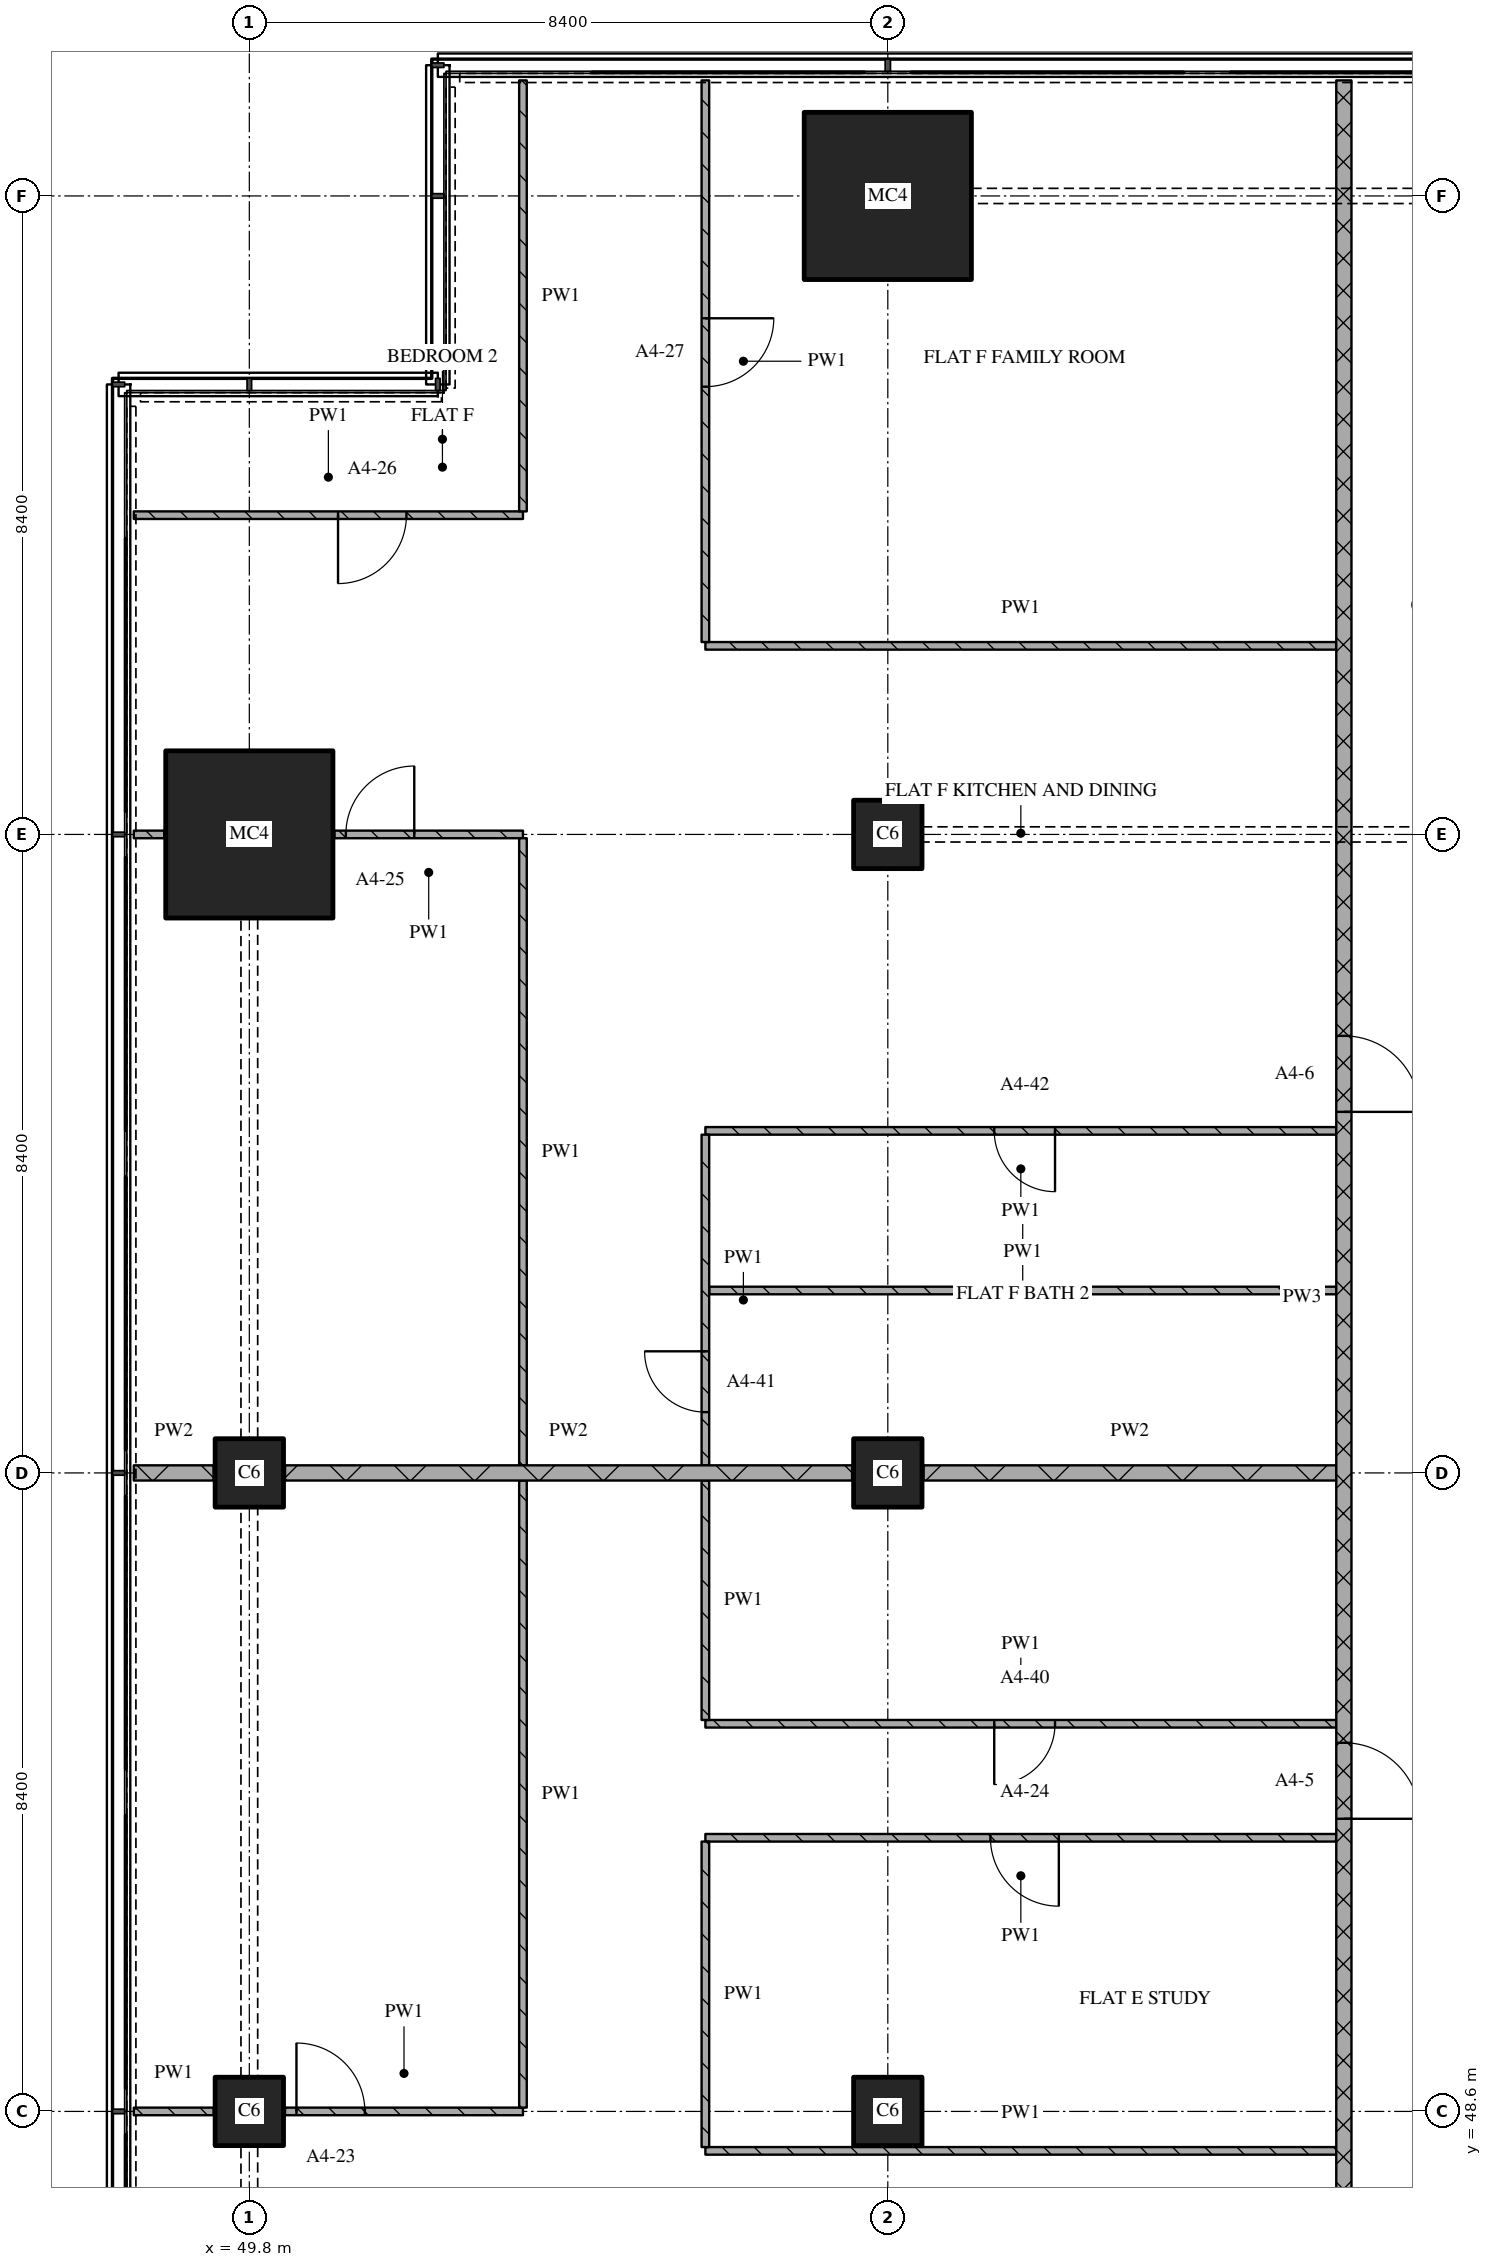
"""IFC4 building model, lengths in metres.
Left out: names, types, materials, properties, quantities, classifications, styles, units other than length and angle.
Written with IfcOpenShell. Run it as: python <this file> out.ifc"""

import sys

from ifc_helpers import new_model, si_unit, direction, frame, frame_2d, origin, origin_2d, place, context, subcontext, project, spatial, rectangle, extrude, element, fill, save


model = new_model("IFC4")
c1 = context("Model", 3, precision=1e-05, world=origin(), true_north=direction((0.0, 1.0)))
c2 = subcontext(c1, "Body", "Model", "MODEL_VIEW")
j1 = project(units=[si_unit("LENGTHUNIT", "METRE"), si_unit("PLANEANGLEUNIT", "RADIAN")], contexts=[c1])
p1 = place(None, origin())
s1 = spatial("IfcSite", under=j1, at=p1, CompositionType="ELEMENT")
p2 = place(p1, origin())
s2 = spatial("IfcBuilding", under=s1, at=p2, CompositionType="ELEMENT")
p3 = place(p2, frame((0.0, 0.0, 76.8)))
s3 = spatial("IfcBuildingStorey", under=s2, at=p3, CompositionType="ELEMENT", Elevation=76.8)
for number, where, z_axis, x_axis in (
    (1, (49.8, 48.6, 0.0), (0.0, 0.0, 1.0), (1.0, 0.0, 0.0)),
    (2, (49.8, 57.0, 0.0), (0.0, 0.0, 1.0), (1.0, 0.0, 0.0)),
):
    element("IfcColumn", number, at=place(p3, frame(where, z_axis=z_axis, x_axis=x_axis)), inside=s3, PredefinedType="COLUMN", context=c2, shape_type="SweptSolid", body=[
        extrude(rectangle(XDim=0.9, YDim=0.9, at=origin_2d()), origin(), (0.0, 0.0, 1.0), 3.6),
    ])
p4 = place(p3, frame((49.8, 65.4, 0.0), z_axis=(0.0, 0.0, 1.0), x_axis=(1.0, 0.0, 0.0)))
e3 = element("IfcColumn", 3, at=p4, inside=s3, PredefinedType="COLUMN", context=c2, shape_type="SweptSolid", body=[
    extrude(rectangle(XDim=2.2, YDim=2.2, at=origin_2d()), origin(), (0.0, 0.0, 1.0), 3.6),
])
for number, where, z_axis, x_axis in (
    (4, (58.2, 48.6, 0.0), (0.0, 0.0, 1.0), (1.0, 0.0, 0.0)),
    (5, (58.2, 57.0, 0.0), (0.0, 0.0, 1.0), (1.0, 0.0, 0.0)),
    (6, (58.2, 65.4, 0.0), (0.0, 0.0, 1.0), (1.0, 0.0, 0.0)),
):
    element("IfcColumn", number, at=place(p3, frame(where, z_axis=z_axis, x_axis=x_axis)), inside=s3, PredefinedType="COLUMN", context=c2, shape_type="SweptSolid", body=[
        extrude(rectangle(XDim=0.9, YDim=0.9, at=origin_2d()), origin(), (0.0, 0.0, 1.0), 3.6),
    ])
p5 = place(p3, frame((58.2, 73.8, 0.0), z_axis=(0.0, 0.0, 1.0), x_axis=(1.0, 0.0, 0.0)))
e7 = element("IfcColumn", 7, at=p5, inside=s3, PredefinedType="COLUMN", context=c2, shape_type="SweptSolid", body=[
    extrude(rectangle(XDim=2.2, YDim=2.2, at=origin_2d()), origin(), (0.0, 0.0, 1.0), 3.6),
])
p6 = place(p3, frame((55.8, 48.081, 0.0), z_axis=(0.0, 0.0, 1.0), x_axis=(1.0, 0.0, 0.0)))
e8 = element("IfcWall", 8, at=p6, inside=s3, PredefinedType="PARTITIONING", context=c2, shape_type="SweptSolid", body=[
    extrude(rectangle(XDim=8.3, YDim=0.1, at=frame_2d((4.15, 0.0))), origin(), (0.0, 0.0, 1.0), 3.32),
])
p7 = place(p3, frame((48.28, 48.6, 0.0), z_axis=(0.0, 0.0, 1.0), x_axis=(1.0, 0.0, 0.0)))
e9 = element("IfcWall", 9, at=p7, inside=s3, PredefinedType="PARTITIONING", context=c2, shape_type="SweptSolid", body=[
    extrude(rectangle(XDim=1.05, YDim=0.1, at=frame_2d((0.525, 0.0))), origin(), (0.0, 0.0, 1.0), 3.32),
])
p8 = place(p3, frame((50.27, 48.6, 0.0), z_axis=(0.0, 0.0, 1.0), x_axis=(1.0, 0.0, 0.0)))
e10 = element("IfcWall", 10, at=p8, inside=s3, PredefinedType="PARTITIONING", context=c2, shape_type="SweptSolid", body=[
    extrude(rectangle(XDim=3.13, YDim=0.1, at=frame_2d((1.565, 0.0))), origin(), (0.0, 0.0, 1.0), 3.32),
])
p9 = place(p8, frame((0.15, 0.0, 0.0)))
e11 = element("IfcOpeningElement", 11, at=p9, cuts=e10, PredefinedType="OPENING", context=c2, shape_type="SweptSolid", body=[
    extrude(rectangle(XDim=0.9, YDim=2.1, at=frame_2d((0.45, 1.05))), frame((0.0, 0.06, 0.0), z_axis=(0.0, -1.0, 0.0), x_axis=(1.0, 0.0, 0.0)), (0.0, 0.0, 1.0), 0.12),
])
p10 = place(p3, frame((64.1, 52.2, 0.0), z_axis=(0.0, 0.0, 1.0), x_axis=(-1.0, 0.0, 0.0)))
e12 = element("IfcWall", 12, at=p10, inside=s3, PredefinedType="PARTITIONING", context=c2, shape_type="SweptSolid", body=[
    extrude(rectangle(XDim=8.3, YDim=0.1, at=frame_2d((4.15, 0.0))), origin(), (0.0, 0.0, 1.0), 3.32),
])
p11 = place(p10, frame((3.65, 0.0, 0.0)))
e13 = element("IfcOpeningElement", 13, at=p11, cuts=e12, PredefinedType="OPENING", context=c2, shape_type="SweptSolid", body=[
    extrude(rectangle(XDim=0.9, YDim=2.1, at=frame_2d((0.45, 1.05))), frame((0.0, 0.06, 0.0), z_axis=(0.0, -1.0, 0.0), x_axis=(1.0, 0.0, 0.0)), (0.0, 0.0, 1.0), 0.12),
])
p12 = place(p3, frame((55.8, 53.7, 0.0), z_axis=(0.0, 0.0, 1.0), x_axis=(1.0, 0.0, 0.0)))
e14 = element("IfcWall", 14, at=p12, inside=s3, PredefinedType="PARTITIONING", context=c2, shape_type="SweptSolid", body=[
    extrude(rectangle(XDim=8.3, YDim=0.1, at=frame_2d((4.15, 0.0))), origin(), (0.0, 0.0, 1.0), 3.32),
])
p13 = place(p12, frame((3.8, 0.0, 0.0)))
e15 = element("IfcOpeningElement", 15, at=p13, cuts=e14, PredefinedType="OPENING", context=c2, shape_type="SweptSolid", body=[
    extrude(rectangle(XDim=0.8, YDim=2.1, at=frame_2d((0.4, 1.05))), frame((0.0, 0.06, 0.0), z_axis=(0.0, -1.0, 0.0), x_axis=(1.0, 0.0, 0.0)), (0.0, 0.0, 1.0), 0.12),
])
p14 = place(p3, frame((48.28, 57.0, 0.0), z_axis=(0.0, 0.0, 1.0), x_axis=(1.0, 0.0, 0.0)))
e16 = element("IfcWall", 16, at=p14, inside=s3, PredefinedType="PARTITIONING", context=c2, shape_type="SweptSolid", body=[
    extrude(rectangle(XDim=1.05, YDim=0.2, at=frame_2d((0.525, 0.0))), origin(), (0.0, 0.0, 1.0), 3.32),
])
p15 = place(p3, frame((50.27, 57.0, 0.0), z_axis=(0.0, 0.0, 1.0), x_axis=(1.0, 0.0, 0.0)))
e17 = element("IfcWall", 17, at=p15, inside=s3, PredefinedType="PARTITIONING", context=c2, shape_type="SweptSolid", body=[
    extrude(rectangle(XDim=7.46, YDim=0.2, at=frame_2d((3.73, 0.0))), origin(), (0.0, 0.0, 1.0), 3.32),
])
p16 = place(p3, frame((58.67, 57.0, 0.0), z_axis=(0.0, 0.0, 1.0), x_axis=(1.0, 0.0, 0.0)))
e18 = element("IfcWall", 18, at=p16, inside=s3, PredefinedType="PARTITIONING", context=c2, shape_type="SweptSolid", body=[
    extrude(rectangle(XDim=5.43, YDim=0.2, at=frame_2d((2.715, 0.0))), origin(), (0.0, 0.0, 1.0), 3.32),
])
p17 = place(p3, frame((55.85, 59.4, 0.0), z_axis=(0.0, 0.0, 1.0), x_axis=(1.0, 0.0, 0.0)))
e19 = element("IfcWall", 19, at=p17, inside=s3, PredefinedType="PARTITIONING", context=c2, shape_type="SweptSolid", body=[
    extrude(rectangle(XDim=8.25, YDim=0.1, at=frame_2d((4.125, 0.0))), origin(), (0.0, 0.0, 1.0), 3.32),
])
p18 = place(p3, frame((64.1, 61.5, 0.0), z_axis=(0.0, 0.0, 1.0), x_axis=(-1.0, 0.0, 0.0)))
e20 = element("IfcWall", 20, at=p18, inside=s3, PredefinedType="PARTITIONING", context=c2, shape_type="SweptSolid", body=[
    extrude(rectangle(XDim=8.3, YDim=0.1, at=frame_2d((4.15, 0.0))), origin(), (0.0, 0.0, 1.0), 3.32),
])
p19 = place(p18, frame((3.7, 0.0, 0.0)))
e21 = element("IfcOpeningElement", 21, at=p19, cuts=e20, PredefinedType="OPENING", context=c2, shape_type="SweptSolid", body=[
    extrude(rectangle(XDim=0.8, YDim=2.1, at=frame_2d((0.4, 1.05))), frame((0.0, 0.06, 0.0), z_axis=(0.0, -1.0, 0.0), x_axis=(1.0, 0.0, 0.0)), (0.0, 0.0, 1.0), 0.12),
])
p20 = place(p3, frame((48.28, 65.4, 0.0), z_axis=(0.0, 0.0, 1.0), x_axis=(1.0, 0.0, 0.0)))
e22 = element("IfcWall", 22, at=p20, inside=s3, PredefinedType="PARTITIONING", context=c2, shape_type="SweptSolid", body=[
    extrude(rectangle(XDim=0.4, YDim=0.1, at=frame_2d((0.2, 0.0))), origin(), (0.0, 0.0, 1.0), 3.32),
])
p21 = place(p3, frame((53.4, 65.4, 0.0), z_axis=(0.0, 0.0, 1.0), x_axis=(-1.0, 0.0, 0.0)))
e23 = element("IfcWall", 23, at=p21, inside=s3, PredefinedType="PARTITIONING", context=c2, shape_type="SweptSolid", body=[
    extrude(rectangle(XDim=2.48, YDim=0.1, at=frame_2d((1.24, 0.0))), origin(), (0.0, 0.0, 1.0), 3.32),
])
p22 = place(p21, frame((1.43, 0.0, 0.0)))
e24 = element("IfcOpeningElement", 24, at=p22, cuts=e23, PredefinedType="OPENING", context=c2, shape_type="SweptSolid", body=[
    extrude(rectangle(XDim=0.9, YDim=2.1, at=frame_2d((0.45, 1.05))), frame((0.0, 0.06, 0.0), z_axis=(0.0, -1.0, 0.0), x_axis=(1.0, 0.0, 0.0)), (0.0, 0.0, 1.0), 0.12),
])
p23 = place(p3, frame((55.8, 67.881, 0.0), z_axis=(0.0, 0.0, 1.0), x_axis=(1.0, 0.0, 0.0)))
e25 = element("IfcWall", 25, at=p23, inside=s3, PredefinedType="PARTITIONING", context=c2, shape_type="SweptSolid", body=[
    extrude(rectangle(XDim=8.3, YDim=0.1, at=frame_2d((4.15, 0.0))), origin(), (0.0, 0.0, 1.0), 3.32),
])
p24 = place(p3, frame((48.28, 69.6, 0.0), z_axis=(0.0, 0.0, 1.0), x_axis=(1.0, 0.0, 0.0)))
e26 = element("IfcWall", 26, at=p24, inside=s3, PredefinedType="PARTITIONING", context=c2, shape_type="SweptSolid", body=[
    extrude(rectangle(XDim=5.12, YDim=0.1, at=frame_2d((2.56, 0.0))), origin(), (0.0, 0.0, 1.0), 3.32),
])
p25 = place(p24, frame((2.687, 0.0, 0.0)))
e27 = element("IfcOpeningElement", 27, at=p25, cuts=e26, PredefinedType="OPENING", context=c2, shape_type="SweptSolid", body=[
    extrude(rectangle(XDim=0.9, YDim=2.1, at=frame_2d((0.45, 1.05))), frame((0.0, 0.06, 0.0), z_axis=(0.0, -1.0, 0.0), x_axis=(1.0, 0.0, 0.0)), (0.0, 0.0, 1.0), 0.12),
])
p26 = place(p3, frame((53.4, 75.32, 0.0), z_axis=(0.0, 0.0, 1.0), x_axis=(0.0, -1.0, 0.0)))
e28 = element("IfcWall", 28, at=p26, inside=s3, PredefinedType="PARTITIONING", context=c2, shape_type="SweptSolid", body=[
    extrude(rectangle(XDim=5.67, YDim=0.1, at=frame_2d((2.835, 0.0))), origin(), (0.0, 0.0, 1.0), 3.32),
])
p27 = place(p3, frame((55.8, 52.15, 0.0), z_axis=(0.0, 0.0, 1.0), x_axis=(0.0, -1.0, 0.0)))
e29 = element("IfcWall", 29, at=p27, inside=s3, PredefinedType="PARTITIONING", context=c2, shape_type="SweptSolid", body=[
    extrude(rectangle(XDim=4.019, YDim=0.1, at=frame_2d((2.009, 0.0))), origin(), (0.0, 0.0, 1.0), 3.32),
])
p28 = place(p3, frame((55.8, 75.32, 0.0), z_axis=(0.0, 0.0, 1.0), x_axis=(0.0, -1.0, 0.0)))
e30 = element("IfcWall", 30, at=p28, inside=s3, PredefinedType="PARTITIONING", context=c2, shape_type="SweptSolid", body=[
    extrude(rectangle(XDim=7.389, YDim=0.1, at=frame_2d((3.695, 0.0))), origin(), (0.0, 0.0, 1.0), 3.32),
])
p29 = place(p28, frame((3.129, 0.0, 0.0)))
e31 = element("IfcOpeningElement", 31, at=p29, cuts=e30, PredefinedType="OPENING", context=c2, shape_type="SweptSolid", body=[
    extrude(rectangle(XDim=0.9, YDim=2.1, at=frame_2d((0.45, 1.05))), frame((0.0, 0.06, 0.0), z_axis=(0.0, -1.0, 0.0), x_axis=(1.0, 0.0, 0.0)), (0.0, 0.0, 1.0), 0.12),
])
p30 = place(p3, frame((64.2, 43.3, 0.0), z_axis=(0.0, 0.0, 1.0), x_axis=(0.0, 1.0, 0.0)))
e32 = element("IfcWall", 32, at=p30, inside=s3, PredefinedType="PARTITIONING", context=c2, shape_type="SweptSolid", body=[
    extrude(rectangle(XDim=32.02, YDim=0.2, at=frame_2d((16.01, 0.0))), origin(), (0.0, 0.0, 1.0), 3.32),
])
p31 = place(p30, frame((9.15, 0.0, 0.0)))
e33 = element("IfcOpeningElement", 33, at=p31, cuts=e32, PredefinedType="OPENING", context=c2, shape_type="SweptSolid", body=[
    extrude(rectangle(XDim=1.0, YDim=2.1, at=frame_2d((0.5, 1.05))), frame((0.0, 0.11, 0.0), z_axis=(0.0, -1.0, 0.0), x_axis=(1.0, 0.0, 0.0)), (0.0, 0.0, 1.0), 0.22),
])
p32 = place(p30, frame((18.45, 0.0, 0.0)))
e34 = element("IfcOpeningElement", 34, at=p32, cuts=e32, PredefinedType="OPENING", context=c2, shape_type="SweptSolid", body=[
    extrude(rectangle(XDim=1.0, YDim=2.1, at=frame_2d((0.5, 1.05))), frame((0.0, 0.11, 0.0), z_axis=(0.0, -1.0, 0.0), x_axis=(1.0, 0.0, 0.0)), (0.0, 0.0, 1.0), 0.22),
])
for number, where, z_axis, x_axis in (
    (35, (53.4, 56.9, 0.0), (0.0, 0.0, 1.0), (0.0, -1.0, 0.0)),
    (36, (53.4, 65.35, 0.0), (0.0, 0.0, 1.0), (0.0, -1.0, 0.0)),
):
    element("IfcWall", number, at=place(p3, frame(where, z_axis=z_axis, x_axis=x_axis)), inside=s3, PredefinedType="PARTITIONING", context=c2, shape_type="SweptSolid", body=[
        extrude(rectangle(XDim=8.25, YDim=0.1, at=frame_2d((4.125, 0.0))), origin(), (0.0, 0.0, 1.0), 3.32),
    ])
p33 = place(p3, frame((55.8, 56.9, 0.0), z_axis=(0.0, 0.0, 1.0), x_axis=(0.0, -1.0, 0.0)))
e37 = element("IfcWall", 37, at=p33, inside=s3, PredefinedType="PARTITIONING", context=c2, shape_type="SweptSolid", body=[
    extrude(rectangle(XDim=3.15, YDim=0.1, at=frame_2d((1.575, 0.0))), origin(), (0.0, 0.0, 1.0), 3.32),
])
p34 = place(p3, frame((55.8, 61.45, 0.0), z_axis=(0.0, 0.0, 1.0), x_axis=(0.0, -1.0, 0.0)))
e38 = element("IfcWall", 38, at=p34, inside=s3, PredefinedType="PARTITIONING", context=c2, shape_type="SweptSolid", body=[
    extrude(rectangle(XDim=4.35, YDim=0.1, at=frame_2d((2.175, 0.0))), origin(), (0.0, 0.0, 1.0), 3.32),
])
p35 = place(p34, frame((2.85, 0.0, 0.0)))
e39 = element("IfcOpeningElement", 39, at=p35, cuts=e38, PredefinedType="OPENING", context=c2, shape_type="SweptSolid", body=[
    extrude(rectangle(XDim=0.8, YDim=2.1, at=frame_2d((0.4, 1.05))), frame((0.0, 0.06, 0.0), z_axis=(0.0, -1.0, 0.0), x_axis=(1.0, 0.0, 0.0)), (0.0, 0.0, 1.0), 0.12),
])
p36 = place(p9, origin())
e40 = element("IfcDoor", 40, at=p36, inside=s3, OperationType="SINGLE_SWING_LEFT", PredefinedType="DOOR", context=c2, shape_type="SweptSolid", body=[
    extrude(rectangle(XDim=0.9, YDim=2.1, at=frame_2d((0.45, 1.05))), frame((0.0, 0.025, 0.0), z_axis=(0.0, -1.0, 0.0), x_axis=(1.0, 0.0, 0.0)), (0.0, 0.0, 1.0), 0.05),
])
fill(e11, e40)
p37 = place(p11, origin())
e41 = element("IfcDoor", 41, at=p37, inside=s3, OperationType="SINGLE_SWING_LEFT", PredefinedType="DOOR", context=c2, shape_type="SweptSolid", body=[
    extrude(rectangle(XDim=0.9, YDim=2.1, at=frame_2d((0.45, 1.05))), frame((0.0, 0.025, 0.0), z_axis=(0.0, -1.0, 0.0), x_axis=(1.0, 0.0, 0.0)), (0.0, 0.0, 1.0), 0.05),
])
fill(e13, e41)
p38 = place(p13, origin())
e42 = element("IfcDoor", 42, at=p38, inside=s3, OperationType="SINGLE_SWING_RIGHT", PredefinedType="DOOR", context=c2, shape_type="SweptSolid", body=[
    extrude(rectangle(XDim=0.8, YDim=2.1, at=frame_2d((0.4, 1.05))), frame((0.0, 0.025, 0.0), z_axis=(0.0, -1.0, 0.0), x_axis=(1.0, 0.0, 0.0)), (0.0, 0.0, 1.0), 0.05),
])
fill(e15, e42)
p39 = place(p19, origin())
e43 = element("IfcDoor", 43, at=p39, inside=s3, OperationType="SINGLE_SWING_LEFT", PredefinedType="DOOR", context=c2, shape_type="SweptSolid", body=[
    extrude(rectangle(XDim=0.8, YDim=2.1, at=frame_2d((0.4, 1.05))), frame((0.0, 0.025, 0.0), z_axis=(0.0, -1.0, 0.0), x_axis=(1.0, 0.0, 0.0)), (0.0, 0.0, 1.0), 0.05),
])
fill(e21, e43)
p40 = place(p22, origin())
e44 = element("IfcDoor", 44, at=p40, inside=s3, OperationType="SINGLE_SWING_RIGHT", PredefinedType="DOOR", context=c2, shape_type="SweptSolid", body=[
    extrude(rectangle(XDim=0.9, YDim=2.1, at=frame_2d((0.45, 1.05))), frame((0.0, 0.025, 0.0), z_axis=(0.0, -1.0, 0.0), x_axis=(1.0, 0.0, 0.0)), (0.0, 0.0, 1.0), 0.05),
])
fill(e24, e44)
p41 = place(p25, origin())
e45 = element("IfcDoor", 45, at=p41, inside=s3, OperationType="SINGLE_SWING_RIGHT", PredefinedType="DOOR", context=c2, shape_type="SweptSolid", body=[
    extrude(rectangle(XDim=0.9, YDim=2.1, at=frame_2d((0.45, 1.05))), frame((0.0, 0.025, 0.0), z_axis=(0.0, -1.0, 0.0), x_axis=(1.0, 0.0, 0.0)), (0.0, 0.0, 1.0), 0.05),
])
fill(e27, e45)
p42 = place(p29, origin())
e46 = element("IfcDoor", 46, at=p42, inside=s3, OperationType="SINGLE_SWING_LEFT", PredefinedType="DOOR", context=c2, shape_type="SweptSolid", body=[
    extrude(rectangle(XDim=0.9, YDim=2.1, at=frame_2d((0.45, 1.05))), frame((0.0, 0.025, 0.0), z_axis=(0.0, -1.0, 0.0), x_axis=(1.0, 0.0, 0.0)), (0.0, 0.0, 1.0), 0.05),
])
fill(e31, e46)
p43 = place(p31, origin())
e47 = element("IfcDoor", 47, at=p43, inside=s3, OperationType="SINGLE_SWING_RIGHT", PredefinedType="DOOR", context=c2, shape_type="SweptSolid", body=[
    extrude(rectangle(XDim=1.0, YDim=2.1, at=frame_2d((0.5, 1.05))), frame((0.0, 0.025, 0.0), z_axis=(0.0, -1.0, 0.0), x_axis=(1.0, 0.0, 0.0)), (0.0, 0.0, 1.0), 0.05),
])
fill(e33, e47)
p44 = place(p32, origin())
e48 = element("IfcDoor", 48, at=p44, inside=s3, OperationType="SINGLE_SWING_RIGHT", PredefinedType="DOOR", context=c2, shape_type="SweptSolid", body=[
    extrude(rectangle(XDim=1.0, YDim=2.1, at=frame_2d((0.5, 1.05))), frame((0.0, 0.025, 0.0), z_axis=(0.0, -1.0, 0.0), x_axis=(1.0, 0.0, 0.0)), (0.0, 0.0, 1.0), 0.05),
])
fill(e34, e48)
p45 = place(p35, origin())
e49 = element("IfcDoor", 49, at=p45, inside=s3, OperationType="SINGLE_SWING_RIGHT", PredefinedType="DOOR", context=c2, shape_type="SweptSolid", body=[
    extrude(rectangle(XDim=0.8, YDim=2.1, at=frame_2d((0.4, 1.05))), frame((0.0, 0.025, 0.0), z_axis=(0.0, -1.0, 0.0), x_axis=(1.0, 0.0, 0.0)), (0.0, 0.0, 1.0), 0.05),
])
fill(e39, e49)
save(model, sys.argv[1])
